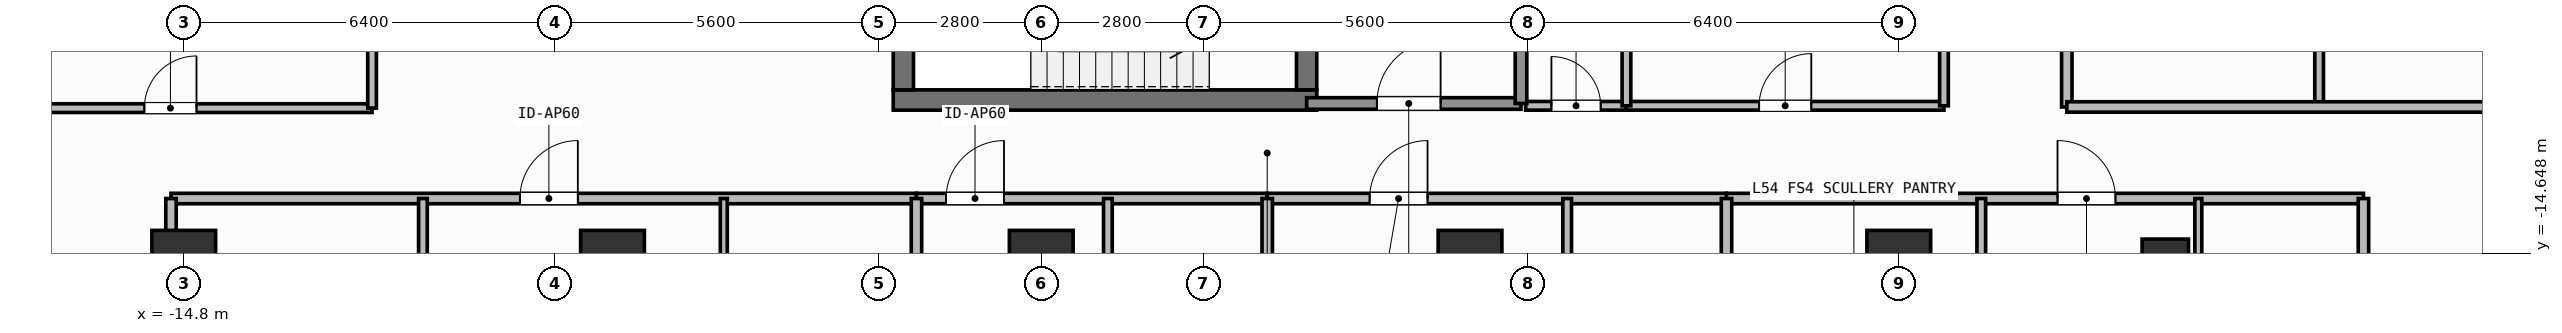
"""IFC4 building model, lengths in metres.
Left out: names, types, materials, properties, quantities, classifications, styles, units other than length and angle.
Written with IfcOpenShell. Run it as: python <this file> out.ifc"""

import sys

from ifc_helpers import new_model, si_unit, direction, frame, frame_2d, origin, origin_2d, place, context, subcontext, project, spatial, rectangle, hollow_rectangle, extrude, element, fill, save


model = new_model("IFC4")
c1 = context("Model", 3, precision=1e-05, world=origin(), true_north=direction((0.0, 1.0)))
c2 = subcontext(c1, "Body", "Model", "MODEL_VIEW")
j1 = project(units=[si_unit("LENGTHUNIT", "METRE"), si_unit("PLANEANGLEUNIT", "RADIAN")], contexts=[c1])
p1 = place(None, origin())
s1 = spatial("IfcSite", under=j1, at=p1, CompositionType="ELEMENT")
p2 = place(p1, origin())
s2 = spatial("IfcBuilding", under=s1, at=p2, CompositionType="ELEMENT")
p3 = place(p2, frame((0.0, 0.0, 219.6)))
s3 = spatial("IfcBuildingStorey", under=s2, at=p3, CompositionType="ELEMENT", Elevation=219.6)
p4 = place(p3, frame((-2.555, -12.0, 0.0), z_axis=(0.0, 0.0, 1.0), x_axis=(1.0, 0.0, 0.0)))
e1 = element("IfcWall", 1, at=p4, inside=s3, PredefinedType="SHEAR", context=c2, shape_type="SweptSolid", body=[
    extrude(rectangle(XDim=7.31, YDim=0.35, at=frame_2d((3.655, 0.0))), origin(), (0.0, 0.0, 1.0), 3.9),
])
p5 = place(p3, frame((-2.38, -11.825, 0.0), z_axis=(0.0, 0.0, 1.0), x_axis=(0.0, 1.0, 0.0)))
e2 = element("IfcWall", 2, at=p5, inside=s3, PredefinedType="SHEAR", context=c2, shape_type="SweptSolid", body=[
    extrude(rectangle(XDim=2.925, YDim=0.35, at=frame_2d((1.462, 0.0))), origin(), (0.0, 0.0, 1.0), 3.9),
])
p6 = place(p3, frame((4.58, -8.9, 0.0), z_axis=(0.0, 0.0, 1.0), x_axis=(0.0, -1.0, 0.0)))
e3 = element("IfcWall", 3, at=p6, inside=s3, PredefinedType="SHEAR", context=c2, shape_type="SweptSolid", body=[
    extrude(rectangle(XDim=2.925, YDim=0.35, at=frame_2d((1.462, 0.0))), origin(), (0.0, 0.0, 1.0), 3.9),
])
p7 = place(p6, frame((0.913, 0.0, 0.0)))
e4 = element("IfcOpeningElement", 4, at=p7, cuts=e3, PredefinedType="OPENING", context=c2, shape_type="SweptSolid", body=[
    extrude(rectangle(XDim=1.1, YDim=2.15, at=frame_2d((0.55, 1.075))), frame((0.0, 0.185, 0.0), z_axis=(0.0, -1.0, 0.0), x_axis=(1.0, 0.0, 0.0)), (0.0, 0.0, 1.0), 0.37),
])
for number, where, z_axis, x_axis in (
    (5, (-14.8, -14.8, 0.0), (0.0, 0.0, 1.0), (1.0, 0.0, 0.0)),
    (6, (-7.4, -14.8, 0.0), (0.0, 0.0, 1.0), (1.0, 0.0, 0.0)),
    (7, (0.0, -14.8, 0.0), (0.0, 0.0, 1.0), (1.0, 0.0, 0.0)),
    (8, (7.4, -14.8, 0.0), (0.0, 0.0, 1.0), (1.0, 0.0, 0.0)),
    (9, (14.8, -14.8, 0.0), (0.0, 0.0, 1.0), (1.0, 0.0, 0.0)),
):
    element("IfcColumn", number, at=place(p3, frame(where, z_axis=z_axis, x_axis=x_axis)), inside=s3, PredefinedType="COLUMN", context=c2, shape_type="SweptSolid", body=[
        extrude(rectangle(XDim=1.1, YDim=1.1, at=origin_2d()), origin(), (0.0, 0.0, 1.0), 3.9),
    ])
p8 = place(p3, frame((19.4, -14.8, 0.0), z_axis=(0.0, 0.0, 1.0), x_axis=(1.0, 0.0, 0.0)))
e10 = element("IfcColumn", 10, at=p8, inside=s3, PredefinedType="COLUMN", context=c2, shape_type="SweptSolid", body=[
    extrude(hollow_rectangle(XDim=0.8, YDim=0.8, WallThickness=0.036, at=origin_2d()), origin(), (0.0, 0.0, 1.0), 3.9),
])
p9 = place(p3, frame((4.58, -12.06, 0.0), z_axis=(0.0, 0.0, 1.0), x_axis=(1.0, 0.0, 0.0)))
e11 = element("IfcWall", 11, at=p9, inside=s3, PredefinedType="SOLIDWALL", context=c2, shape_type="SweptSolid", body=[
    extrude(rectangle(XDim=3.7, YDim=0.2, at=frame_2d((1.85, 0.0))), origin(), (0.0, 0.0, 1.0), 3.68),
])
p10 = place(p9, frame((1.212, 0.0, 0.0)))
e12 = element("IfcOpeningElement", 12, at=p10, cuts=e11, PredefinedType="OPENING", context=c2, shape_type="SweptSolid", body=[
    extrude(rectangle(XDim=1.1, YDim=2.15, at=frame_2d((0.55, 1.075))), frame((0.0, 0.11, 0.0), z_axis=(0.0, -1.0, 0.0), x_axis=(1.0, 0.0, 0.0)), (0.0, 0.0, 1.0), 0.22),
])
p11 = place(p3, frame((8.36, -12.1, 0.0), z_axis=(0.0, 0.0, 1.0), x_axis=(1.0, 0.0, 0.0)))
e13 = element("IfcWall", 13, at=p11, inside=s3, PredefinedType="PARTITIONING", context=c2, shape_type="SweptSolid", body=[
    extrude(rectangle(XDim=1.74, YDim=0.15, at=frame_2d((0.87, 0.0))), origin(), (0.0, 0.0, 1.0), 3.68),
])
p12 = place(p11, frame((0.445, 0.0, 0.0)))
e14 = element("IfcOpeningElement", 14, at=p12, cuts=e13, PredefinedType="OPENING", context=c2, shape_type="SweptSolid", body=[
    extrude(rectangle(XDim=0.85, YDim=2.1, at=frame_2d((0.425, 1.05))), frame((0.0, 0.085, 0.0), z_axis=(0.0, -1.0, 0.0), x_axis=(1.0, 0.0, 0.0)), (0.0, 0.0, 1.0), 0.17),
])
p13 = place(p3, frame((10.1, -12.1, 0.0), z_axis=(0.0, 0.0, 1.0), x_axis=(1.0, 0.0, 0.0)))
e15 = element("IfcWall", 15, at=p13, inside=s3, PredefinedType="PARTITIONING", context=c2, shape_type="SweptSolid", body=[
    extrude(rectangle(XDim=5.48, YDim=0.15, at=frame_2d((2.74, 0.0))), origin(), (0.0, 0.0, 1.0), 3.68),
])
p14 = place(p13, frame((2.29, 0.0, 0.0)))
e16 = element("IfcOpeningElement", 16, at=p14, cuts=e15, PredefinedType="OPENING", context=c2, shape_type="SweptSolid", body=[
    extrude(rectangle(XDim=0.9, YDim=2.1, at=frame_2d((0.45, 1.05))), frame((0.0, 0.085, 0.0), z_axis=(0.0, -1.0, 0.0), x_axis=(1.0, 0.0, 0.0)), (0.0, 0.0, 1.0), 0.17),
])
p15 = place(p3, frame((-15.02, -13.7, 0.0), z_axis=(0.0, 0.0, 1.0), x_axis=(1.0, 0.0, 0.0)))
e17 = element("IfcWall", 17, at=p15, inside=s3, PredefinedType="PARTITIONING", context=c2, shape_type="SweptSolid", body=[
    extrude(rectangle(XDim=12.866, YDim=0.18, at=frame_2d((6.433, 0.0))), origin(), (0.0, 0.0, 1.0), 3.68),
])
p16 = place(p15, frame((6.022, 0.0, 0.0)))
e18 = element("IfcOpeningElement", 18, at=p16, cuts=e17, PredefinedType="OPENING", context=c2, shape_type="SweptSolid", body=[
    extrude(rectangle(XDim=1.0, YDim=2.2, at=frame_2d((0.5, 1.1))), frame((0.0, 0.1, 0.0), z_axis=(0.0, -1.0, 0.0), x_axis=(1.0, 0.0, 0.0)), (0.0, 0.0, 1.0), 0.2),
])
p17 = place(p3, frame((-10.672, -18.19, 0.0), z_axis=(0.0, 0.0, 1.0), x_axis=(0.0, 1.0, 0.0)))
e19 = element("IfcWall", 19, at=p17, inside=s3, PredefinedType="PARTITIONING", context=c2, shape_type="SweptSolid", body=[
    extrude(rectangle(XDim=4.49, YDim=0.15, at=frame_2d((2.245, 0.0))), origin(), (0.0, 0.0, 1.0), 3.68),
])
p18 = place(p17, frame((1.907, 0.0, 0.0)))
e20 = element("IfcOpeningElement", 20, at=p18, cuts=e19, PredefinedType="OPENING", context=c2, shape_type="SweptSolid", body=[
    extrude(rectangle(XDim=0.85, YDim=2.1, at=frame_2d((0.425, 1.05))), frame((0.0, 0.085, 0.0), z_axis=(0.0, -1.0, 0.0), x_axis=(1.0, 0.0, 0.0)), (0.0, 0.0, 1.0), 0.17),
])
p19 = place(p3, frame((-5.479, -21.183, 0.0), z_axis=(0.0, 0.0, 1.0), x_axis=(0.0, 1.0, 0.0)))
e21 = element("IfcWall", 21, at=p19, inside=s3, PredefinedType="PARTITIONING", context=c2, shape_type="SweptSolid", body=[
    extrude(rectangle(XDim=7.483, YDim=0.12, at=frame_2d((3.742, 0.0))), origin(), (0.0, 0.0, 1.0), 3.68),
])
p20 = place(p19, frame((3.316, 0.0, 0.0)))
e22 = element("IfcOpeningElement", 22, at=p20, cuts=e21, PredefinedType="OPENING", context=c2, shape_type="SweptSolid", body=[
    extrude(rectangle(XDim=0.85, YDim=2.1, at=frame_2d((0.425, 1.05))), frame((0.0, 0.07, 0.0), z_axis=(0.0, -1.0, 0.0), x_axis=(1.0, 0.0, 0.0)), (0.0, 0.0, 1.0), 0.14),
])
p21 = place(p3, frame((-2.154, -13.7, 0.0), z_axis=(0.0, 0.0, 1.0), x_axis=(1.0, 0.0, 0.0)))
e23 = element("IfcWall", 23, at=p21, inside=s3, PredefinedType="PARTITIONING", context=c2, shape_type="SweptSolid", body=[
    extrude(rectangle(XDim=6.054, YDim=0.18, at=frame_2d((3.027, 0.0))), origin(), (0.0, 0.0, 1.0), 3.68),
])
p22 = place(p21, frame((0.511, 0.0, 0.0)))
e24 = element("IfcOpeningElement", 24, at=p22, cuts=e23, PredefinedType="OPENING", context=c2, shape_type="SweptSolid", body=[
    extrude(rectangle(XDim=1.0, YDim=2.2, at=frame_2d((0.5, 1.1))), frame((0.0, 0.1, 0.0), z_axis=(0.0, -1.0, 0.0), x_axis=(1.0, 0.0, 0.0)), (0.0, 0.0, 1.0), 0.2),
])
p23 = place(p3, frame((1.15, -19.579, 0.0), z_axis=(0.0, 0.0, 1.0), x_axis=(0.0, 1.0, 0.0)))
e25 = element("IfcWall", 25, at=p23, inside=s3, PredefinedType="PARTITIONING", context=c2, shape_type="SweptSolid", body=[
    extrude(rectangle(XDim=5.879, YDim=0.15, at=frame_2d((2.939, 0.0))), origin(), (0.0, 0.0, 1.0), 3.68),
])
p24 = place(p23, frame((2.602, 0.0, 0.0)))
e26 = element("IfcOpeningElement", 26, at=p24, cuts=e25, PredefinedType="OPENING", context=c2, shape_type="SweptSolid", body=[
    extrude(rectangle(XDim=0.85, YDim=2.1, at=frame_2d((0.425, 1.05))), frame((0.0, 0.085, 0.0), z_axis=(0.0, -1.0, 0.0), x_axis=(1.0, 0.0, 0.0)), (0.0, 0.0, 1.0), 0.17),
])
p25 = place(p3, frame((3.9, -13.7, 0.0), z_axis=(0.0, 0.0, 1.0), x_axis=(1.0, 0.0, 0.0)))
e27 = element("IfcWall", 27, at=p25, inside=s3, PredefinedType="PARTITIONING", context=c2, shape_type="SweptSolid", body=[
    extrude(rectangle(XDim=7.927, YDim=0.18, at=frame_2d((3.963, 0.0))), origin(), (0.0, 0.0, 1.0), 3.68),
])
p26 = place(p25, frame((1.767, 0.0, 0.0)))
e28 = element("IfcOpeningElement", 28, at=p26, cuts=e27, PredefinedType="OPENING", context=c2, shape_type="SweptSolid", body=[
    extrude(rectangle(XDim=1.0, YDim=2.2, at=frame_2d((0.5, 1.1))), frame((0.0, 0.1, 0.0), z_axis=(0.0, -1.0, 0.0), x_axis=(1.0, 0.0, 0.0)), (0.0, 0.0, 1.0), 0.2),
])
p27 = place(p3, frame((9.077, -19.579, 0.0), z_axis=(0.0, 0.0, 1.0), x_axis=(0.0, 1.0, 0.0)))
e29 = element("IfcWall", 29, at=p27, inside=s3, PredefinedType="PARTITIONING", context=c2, shape_type="SweptSolid", body=[
    extrude(rectangle(XDim=5.879, YDim=0.15, at=frame_2d((2.939, 0.0))), origin(), (0.0, 0.0, 1.0), 3.68),
])
p28 = place(p27, frame((2.95, 0.0, 0.0)))
e30 = element("IfcOpeningElement", 30, at=p28, cuts=e29, PredefinedType="OPENING", context=c2, shape_type="SweptSolid", body=[
    extrude(rectangle(XDim=0.85, YDim=2.1, at=frame_2d((0.425, 1.05))), frame((0.0, 0.085, 0.0), z_axis=(0.0, -1.0, 0.0), x_axis=(1.0, 0.0, 0.0)), (0.0, 0.0, 1.0), 0.17),
])
p29 = place(p3, frame((11.827, -13.7, 0.0), z_axis=(0.0, 0.0, 1.0), x_axis=(1.0, 0.0, 0.0)))
e31 = element("IfcWall", 31, at=p29, inside=s3, PredefinedType="PARTITIONING", context=c2, shape_type="SweptSolid", body=[
    extrude(rectangle(XDim=10.993, YDim=0.18, at=frame_2d((5.497, 0.0))), origin(), (0.0, 0.0, 1.0), 3.68),
])
p30 = place(p29, frame((5.713, 0.0, 0.0)))
e32 = element("IfcOpeningElement", 32, at=p30, cuts=e31, PredefinedType="OPENING", context=c2, shape_type="SweptSolid", body=[
    extrude(rectangle(XDim=1.0, YDim=2.2, at=frame_2d((0.5, 1.1))), frame((0.0, 0.1, 0.0), z_axis=(0.0, -1.0, 0.0), x_axis=(1.0, 0.0, 0.0)), (0.0, 0.0, 1.0), 0.2),
])
p31 = place(p3, frame((16.224, -18.19, 0.0), z_axis=(0.0, 0.0, 1.0), x_axis=(0.0, 1.0, 0.0)))
e33 = element("IfcWall", 33, at=p31, inside=s3, PredefinedType="PARTITIONING", context=c2, shape_type="SweptSolid", body=[
    extrude(rectangle(XDim=4.49, YDim=0.15, at=frame_2d((2.245, 0.0))), origin(), (0.0, 0.0, 1.0), 3.68),
])
p32 = place(p31, frame((1.907, 0.0, 0.0)))
e34 = element("IfcOpeningElement", 34, at=p32, cuts=e33, PredefinedType="OPENING", context=c2, shape_type="SweptSolid", body=[
    extrude(rectangle(XDim=0.85, YDim=2.1, at=frame_2d((0.425, 1.05))), frame((0.0, 0.085, 0.0), z_axis=(0.0, -1.0, 0.0), x_axis=(1.0, 0.0, 0.0)), (0.0, 0.0, 1.0), 0.17),
])
p33 = place(p3, frame((19.97, -21.183, 0.0), z_axis=(0.0, 0.0, 1.0), x_axis=(0.0, 1.0, 0.0)))
e35 = element("IfcWall", 35, at=p33, inside=s3, PredefinedType="PARTITIONING", context=c2, shape_type="SweptSolid", body=[
    extrude(rectangle(XDim=7.483, YDim=0.12, at=frame_2d((3.742, 0.0))), origin(), (0.0, 0.0, 1.0), 3.68),
])
p34 = place(p33, frame((3.316, 0.0, 0.0)))
e36 = element("IfcOpeningElement", 36, at=p34, cuts=e35, PredefinedType="OPENING", context=c2, shape_type="SweptSolid", body=[
    extrude(rectangle(XDim=0.85, YDim=2.1, at=frame_2d((0.425, 1.05))), frame((0.0, 0.07, 0.0), z_axis=(0.0, -1.0, 0.0), x_axis=(1.0, 0.0, 0.0)), (0.0, 0.0, 1.0), 0.14),
])
p35 = place(p3, frame((-18.33, -12.14, 0.0), z_axis=(0.0, 0.0, 1.0), x_axis=(1.0, 0.0, 0.0)))
e37 = element("IfcWall", 37, at=p35, inside=s3, PredefinedType="PARTITIONING", context=c2, shape_type="SweptSolid", body=[
    extrude(rectangle(XDim=6.78, YDim=0.15, at=frame_2d((3.39, 0.0))), origin(), (0.0, 0.0, 1.0), 3.68),
])
p36 = place(p35, frame((2.85, 0.0, 0.0)))
e38 = element("IfcOpeningElement", 38, at=p36, cuts=e37, PredefinedType="OPENING", context=c2, shape_type="SweptSolid", body=[
    extrude(rectangle(XDim=0.9, YDim=2.1, at=frame_2d((0.45, 1.05))), frame((0.0, 0.085, 0.0), z_axis=(0.0, -1.0, 0.0), x_axis=(1.0, 0.0, 0.0)), (0.0, 0.0, 1.0), 0.17),
])
p37 = place(p3, frame((17.7, -12.12, 0.0), z_axis=(0.0, 0.0, 1.0), x_axis=(0.0, 1.0, 0.0)))
e39 = element("IfcWall", 39, at=p37, inside=s3, PredefinedType="PARTITIONING", context=c2, shape_type="SweptSolid", body=[
    extrude(rectangle(XDim=23.55, YDim=0.18, at=frame_2d((11.775, 0.0))), origin(), (0.0, 0.0, 1.0), 3.68),
])
p38 = place(p37, frame((11.454, 0.0, 0.0)))
e40 = element("IfcOpeningElement", 40, at=p38, cuts=e39, PredefinedType="OPENING", context=c2, shape_type="SweptSolid", body=[
    extrude(rectangle(XDim=1.0, YDim=2.2, at=frame_2d((0.5, 1.1))), frame((0.0, 0.1, 0.0), z_axis=(0.0, -1.0, 0.0), x_axis=(1.0, 0.0, 0.0)), (0.0, 0.0, 1.0), 0.2),
])
p39 = place(p3, frame((8.28, -12.06, 0.0), z_axis=(0.0, 0.0, 1.0), x_axis=(0.0, 1.0, 0.0)))
e41 = element("IfcWall", 41, at=p39, inside=s3, PredefinedType="SOLIDWALL", context=c2, shape_type="SweptSolid", body=[
    extrude(rectangle(XDim=3.26, YDim=0.2, at=frame_2d((1.63, 0.0))), origin(), (0.0, 0.0, 1.0), 3.68),
])
p40 = place(p3, frame((10.1, -12.1, 0.0), z_axis=(0.0, 0.0, 1.0), x_axis=(0.0, 1.0, 0.0)))
e42 = element("IfcWall", 42, at=p40, inside=s3, PredefinedType="PARTITIONING", context=c2, shape_type="SweptSolid", body=[
    extrude(rectangle(XDim=2.35, YDim=0.15, at=frame_2d((1.175, 0.0))), origin(), (0.0, 0.0, 1.0), 3.68),
])
p41 = place(p3, frame((15.58, -12.1, 0.0), z_axis=(0.0, 0.0, 1.0), x_axis=(0.0, 1.0, 0.0)))
e43 = element("IfcWall", 43, at=p41, inside=s3, PredefinedType="PARTITIONING", context=c2, shape_type="SweptSolid", body=[
    extrude(rectangle(XDim=6.25, YDim=0.15, at=frame_2d((3.125, 0.0))), origin(), (0.0, 0.0, 1.0), 3.68),
])
for number, where, z_axis, x_axis in (
    (44, (-2.154, -28.63, 0.0), (0.0, 0.0, 1.0), (0.0, 1.0, 0.0)),
    (45, (3.9, -28.63, 0.0), (0.0, 0.0, 1.0), (0.0, 1.0, 0.0)),
    (46, (11.827, -28.63, 0.0), (0.0, 0.0, 1.0), (0.0, 1.0, 0.0)),
):
    element("IfcWall", number, at=place(p3, frame(where, z_axis=z_axis, x_axis=x_axis)), inside=s3, PredefinedType="PARTITIONING", context=c2, shape_type="SweptSolid", body=[
        extrude(rectangle(XDim=14.93, YDim=0.18, at=frame_2d((7.465, 0.0))), origin(), (0.0, 0.0, 1.0), 3.68),
    ])
for number, where, z_axis, x_axis in (
    (47, (-15.02, -27.51, 0.0), (0.0, 0.0, 1.0), (0.0, 1.0, 0.0)),
    (48, (22.82, -27.51, 0.0), (0.0, 0.0, 1.0), (0.0, 1.0, 0.0)),
):
    element("IfcWall", number, at=place(p3, frame(where, z_axis=z_axis, x_axis=x_axis)), inside=s3, PredefinedType="PARTITIONING", context=c2, shape_type="SweptSolid", body=[
        extrude(rectangle(XDim=13.81, YDim=0.18, at=frame_2d((6.905, 0.0))), origin(), (0.0, 0.0, 1.0), 3.68),
    ])
p42 = place(p3, frame((-11.55, -12.14, 0.0), z_axis=(0.0, 0.0, 1.0), x_axis=(0.0, 1.0, 0.0)))
e49 = element("IfcWall", 49, at=p42, inside=s3, PredefinedType="PARTITIONING", context=c2, shape_type="SweptSolid", body=[
    extrude(rectangle(XDim=16.24, YDim=0.15, at=frame_2d((8.12, 0.0))), origin(), (0.0, 0.0, 1.0), 3.68),
])
p43 = place(p3, frame((22.055, -12.12, 0.0), z_axis=(0.0, 0.0, 1.0), x_axis=(0.0, 1.0, 0.0)))
e50 = element("IfcWall", 50, at=p43, inside=s3, PredefinedType="PARTITIONING", context=c2, shape_type="SweptSolid", body=[
    extrude(rectangle(XDim=6.708, YDim=0.15, at=frame_2d((3.354, 0.0))), origin(), (0.0, 0.0, 1.0), 3.68),
])
p44 = place(p3, frame((17.7, -12.12, 0.0), z_axis=(0.0, 0.0, 1.0), x_axis=(1.0, 0.0, 0.0)))
e51 = element("IfcWall", 51, at=p44, inside=s3, PredefinedType="PARTITIONING", context=c2, shape_type="SweptSolid", body=[
    extrude(rectangle(XDim=8.43, YDim=0.18, at=frame_2d((4.215, 0.0))), origin(), (0.0, 0.0, 1.0), 3.68),
])
p45 = place(p10, origin())
e52 = element("IfcDoor", 52, at=p45, inside=s3, OperationType="SINGLE_SWING_RIGHT", PredefinedType="DOOR", context=c2, shape_type="SweptSolid", body=[
    extrude(rectangle(XDim=1.1, YDim=2.15, at=frame_2d((0.55, 1.075))), frame((0.0, 0.025, 0.0), z_axis=(0.0, -1.0, 0.0), x_axis=(1.0, 0.0, 0.0)), (0.0, 0.0, 1.0), 0.05),
])
fill(e12, e52)
p46 = place(p12, origin())
e53 = element("IfcDoor", 53, at=p46, inside=s3, OperationType="SINGLE_SWING_LEFT", PredefinedType="DOOR", context=c2, shape_type="SweptSolid", body=[
    extrude(rectangle(XDim=0.85, YDim=2.1, at=frame_2d((0.425, 1.05))), frame((0.0, 0.025, 0.0), z_axis=(0.0, -1.0, 0.0), x_axis=(1.0, 0.0, 0.0)), (0.0, 0.0, 1.0), 0.05),
])
fill(e14, e53)
p47 = place(p14, origin())
e54 = element("IfcDoor", 54, at=p47, inside=s3, OperationType="SINGLE_SWING_RIGHT", PredefinedType="DOOR", context=c2, shape_type="SweptSolid", body=[
    extrude(rectangle(XDim=0.9, YDim=2.1, at=frame_2d((0.45, 1.05))), frame((0.0, 0.025, 0.0), z_axis=(0.0, -1.0, 0.0), x_axis=(1.0, 0.0, 0.0)), (0.0, 0.0, 1.0), 0.05),
])
fill(e16, e54)
p48 = place(p16, origin())
e55 = element("IfcDoor", 55, at=p48, inside=s3, OperationType="SINGLE_SWING_RIGHT", PredefinedType="DOOR", context=c2, shape_type="SweptSolid", body=[
    extrude(rectangle(XDim=1.0, YDim=2.2, at=frame_2d((0.5, 1.1))), frame((0.0, 0.025, 0.0), z_axis=(0.0, -1.0, 0.0), x_axis=(1.0, 0.0, 0.0)), (0.0, 0.0, 1.0), 0.05),
])
fill(e18, e55)
p49 = place(p22, origin())
e56 = element("IfcDoor", 56, at=p49, inside=s3, OperationType="SINGLE_SWING_RIGHT", PredefinedType="DOOR", context=c2, shape_type="SweptSolid", body=[
    extrude(rectangle(XDim=1.0, YDim=2.2, at=frame_2d((0.5, 1.1))), frame((0.0, 0.025, 0.0), z_axis=(0.0, -1.0, 0.0), x_axis=(1.0, 0.0, 0.0)), (0.0, 0.0, 1.0), 0.05),
])
fill(e24, e56)
p50 = place(p26, origin())
e57 = element("IfcDoor", 57, at=p50, inside=s3, OperationType="SINGLE_SWING_RIGHT", PredefinedType="DOOR", context=c2, shape_type="SweptSolid", body=[
    extrude(rectangle(XDim=1.0, YDim=2.2, at=frame_2d((0.5, 1.1))), frame((0.0, 0.025, 0.0), z_axis=(0.0, -1.0, 0.0), x_axis=(1.0, 0.0, 0.0)), (0.0, 0.0, 1.0), 0.05),
])
fill(e28, e57)
p51 = place(p30, origin())
e58 = element("IfcDoor", 58, at=p51, inside=s3, OperationType="SINGLE_SWING_LEFT", PredefinedType="DOOR", context=c2, shape_type="SweptSolid", body=[
    extrude(rectangle(XDim=1.0, YDim=2.2, at=frame_2d((0.5, 1.1))), frame((0.0, 0.025, 0.0), z_axis=(0.0, -1.0, 0.0), x_axis=(1.0, 0.0, 0.0)), (0.0, 0.0, 1.0), 0.05),
])
fill(e32, e58)
p52 = place(p36, origin())
e59 = element("IfcDoor", 59, at=p52, inside=s3, OperationType="SINGLE_SWING_RIGHT", PredefinedType="DOOR", context=c2, shape_type="SweptSolid", body=[
    extrude(rectangle(XDim=0.9, YDim=2.1, at=frame_2d((0.45, 1.05))), frame((0.0, 0.025, 0.0), z_axis=(0.0, -1.0, 0.0), x_axis=(1.0, 0.0, 0.0)), (0.0, 0.0, 1.0), 0.05),
])
fill(e38, e59)
save(model, sys.argv[1])
